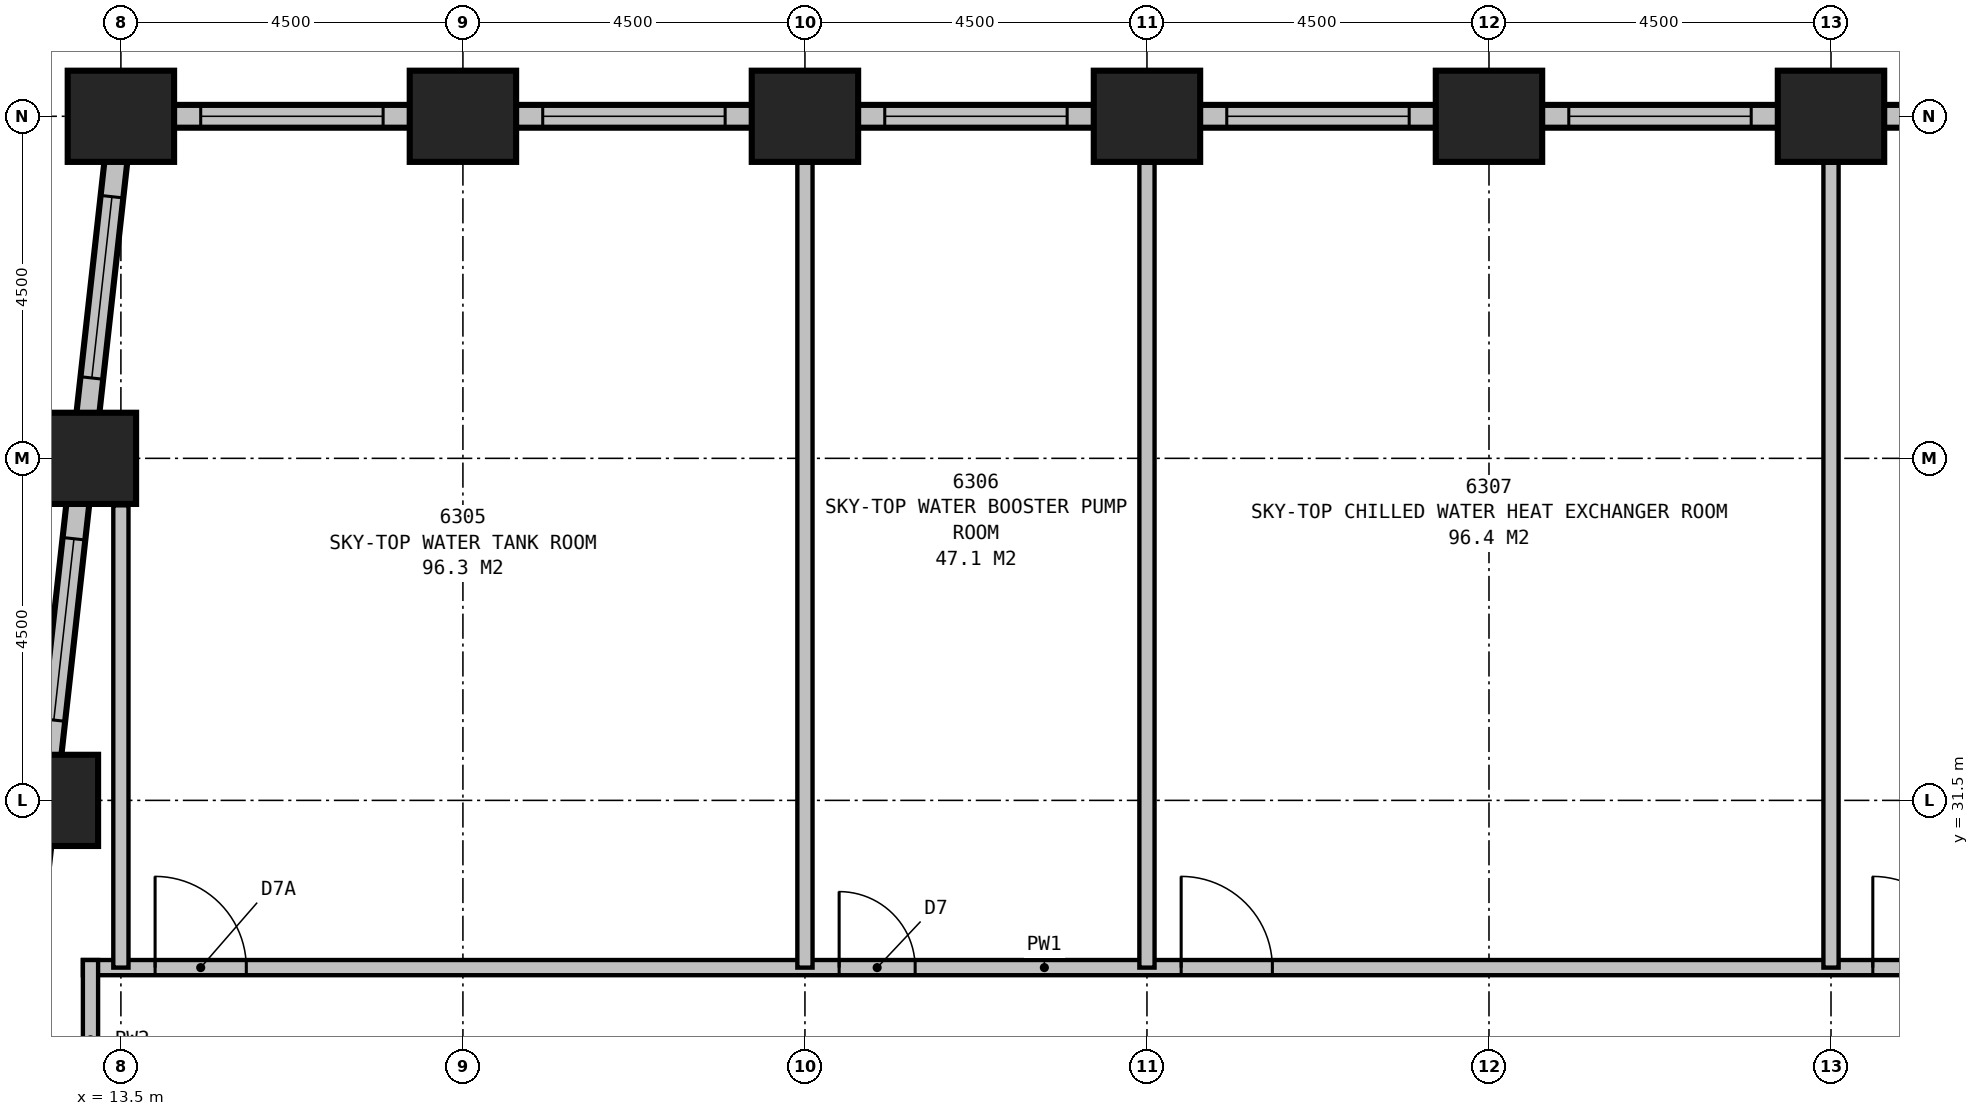
"""IFC4 building model, lengths in metres.
Left out: names, types, materials, properties, quantities, classifications, styles, units other than length and angle.
Written with IfcOpenShell. Run it as: python <this file> out.ifc"""

import sys

from ifc_helpers import new_model, si_unit, direction, frame, frame_2d, origin, origin_2d, place, context, subcontext, project, spatial, rectangle, extrude, element, fill, save


model = new_model("IFC4")
c1 = context("Model", 3, precision=1e-05, world=origin(), true_north=direction((0.0, 1.0)))
c2 = subcontext(c1, "Body", "Model", "MODEL_VIEW")
j1 = project(units=[si_unit("LENGTHUNIT", "METRE"), si_unit("PLANEANGLEUNIT", "RADIAN")], contexts=[c1])
p1 = place(None, origin())
s1 = spatial("IfcSite", under=j1, at=p1, CompositionType="ELEMENT")
p2 = place(p1, origin())
s2 = spatial("IfcBuilding", under=s1, at=p2, CompositionType="ELEMENT")
p3 = place(p2, frame((0.0, 0.0, 244.7)))
s3 = spatial("IfcBuildingStorey", under=s2, at=p3, CompositionType="ELEMENT", Elevation=244.7)
for number, where, z_axis, x_axis in (
    (1, (36.0, 40.5, 0.0), (0.0, 0.0, 1.0), (1.0, 0.0, 0.0)),
    (2, (31.5, 40.5, 0.0), (0.0, 0.0, 1.0), (1.0, 0.0, 0.0)),
    (3, (27.0, 40.5, 0.0), (0.0, 0.0, 1.0), (1.0, 0.0, 0.0)),
    (4, (22.5, 40.5, 0.0), (0.0, 0.0, 1.0), (1.0, 0.0, 0.0)),
    (5, (18.0, 40.5, 0.0), (0.0, 0.0, 1.0), (1.0, 0.0, 0.0)),
    (6, (13.5, 40.5, 0.0), (0.0, 0.0, 1.0), (1.0, 0.0, 0.0)),
    (7, (13.0, 36.0, 0.0), (0.0, 0.0, 1.0), (1.0, 0.0, 0.0)),
    (8, (12.5, 31.5, 0.0), (0.0, 0.0, 1.0), (1.0, 0.0, 0.0)),
):
    element("IfcColumn", number, at=place(p3, frame(where, z_axis=z_axis, x_axis=x_axis)), inside=s3, PredefinedType="COLUMN", context=c2, shape_type="SweptSolid", body=[
        extrude(rectangle(XDim=1.4, YDim=1.2, at=origin_2d()), origin(), (0.0, 0.0, 1.0), 6.0),
    ])
p4 = place(p3, frame((40.65, 40.5, 0.0), z_axis=(0.0, 0.0, 1.0), x_axis=(-1.0, 0.0, 0.0)))
e9 = element("IfcWall", 9, at=p4, inside=s3, PredefinedType="STANDARD", context=c2, shape_type="SweptSolid", body=[
    extrude(rectangle(XDim=27.3, YDim=0.3, at=frame_2d((13.65, 0.0))), origin(), (0.0, 0.0, 1.0), 4.45),
])
p5 = place(p4, frame((1.2, 0.0, 0.5)))
e10 = element("IfcOpeningElement", 10, at=p5, cuts=e9, PredefinedType="OPENING", context=c2, shape_type="SweptSolid", body=[
    extrude(rectangle(XDim=2.4, YDim=2.0, at=frame_2d((1.2, 1.0))), frame((0.0, 0.16, 0.0), z_axis=(0.0, -1.0, 0.0), x_axis=(1.0, 0.0, 0.0)), (0.0, 0.0, 1.0), 0.32),
])
p6 = place(p4, frame((5.7, 0.0, 0.5)))
e11 = element("IfcOpeningElement", 11, at=p6, cuts=e9, PredefinedType="OPENING", context=c2, shape_type="SweptSolid", body=[
    extrude(rectangle(XDim=2.4, YDim=2.0, at=frame_2d((1.2, 1.0))), frame((0.0, 0.16, 0.0), z_axis=(0.0, -1.0, 0.0), x_axis=(1.0, 0.0, 0.0)), (0.0, 0.0, 1.0), 0.32),
])
p7 = place(p4, frame((10.2, 0.0, 0.5)))
e12 = element("IfcOpeningElement", 12, at=p7, cuts=e9, PredefinedType="OPENING", context=c2, shape_type="SweptSolid", body=[
    extrude(rectangle(XDim=2.4, YDim=2.0, at=frame_2d((1.2, 1.0))), frame((0.0, 0.16, 0.0), z_axis=(0.0, -1.0, 0.0), x_axis=(1.0, 0.0, 0.0)), (0.0, 0.0, 1.0), 0.32),
])
p8 = place(p4, frame((14.7, 0.0, 0.5)))
e13 = element("IfcOpeningElement", 13, at=p8, cuts=e9, PredefinedType="OPENING", context=c2, shape_type="SweptSolid", body=[
    extrude(rectangle(XDim=2.4, YDim=2.0, at=frame_2d((1.2, 1.0))), frame((0.0, 0.16, 0.0), z_axis=(0.0, -1.0, 0.0), x_axis=(1.0, 0.0, 0.0)), (0.0, 0.0, 1.0), 0.32),
])
p9 = place(p4, frame((19.2, 0.0, 0.5)))
e14 = element("IfcOpeningElement", 14, at=p9, cuts=e9, PredefinedType="OPENING", context=c2, shape_type="SweptSolid", body=[
    extrude(rectangle(XDim=2.4, YDim=2.0, at=frame_2d((1.2, 1.0))), frame((0.0, 0.16, 0.0), z_axis=(0.0, -1.0, 0.0), x_axis=(1.0, 0.0, 0.0)), (0.0, 0.0, 1.0), 0.32),
])
p10 = place(p4, frame((23.7, 0.0, 0.5)))
e15 = element("IfcOpeningElement", 15, at=p10, cuts=e9, PredefinedType="OPENING", context=c2, shape_type="SweptSolid", body=[
    extrude(rectangle(XDim=2.4, YDim=2.0, at=frame_2d((1.2, 1.0))), frame((0.0, 0.16, 0.0), z_axis=(0.0, -1.0, 0.0), x_axis=(1.0, 0.0, 0.0)), (0.0, 0.0, 1.0), 0.32),
])
p11 = place(p3, frame((13.517, 40.649, 0.0), z_axis=(0.0, 0.0, 1.0), x_axis=(-0.110433201132, -0.993883548555, 0.0)))
e16 = element("IfcWall", 16, at=p11, inside=s3, PredefinedType="STANDARD", context=c2, shape_type="SweptSolid", body=[
    extrude(rectangle(XDim=31.994, YDim=0.3, at=frame_2d((15.997, 0.0))), origin(), (0.0, 0.0, 1.0), 4.45),
])
p12 = place(p11, frame((1.214, 0.0, 0.5)))
e17 = element("IfcOpeningElement", 17, at=p12, cuts=e16, PredefinedType="OPENING", context=c2, shape_type="SweptSolid", body=[
    extrude(rectangle(XDim=2.4, YDim=2.0, at=frame_2d((1.2, 1.0))), frame((0.0, 0.16, 0.0), z_axis=(0.0, -1.0, 0.0), x_axis=(1.0, 0.0, 0.0)), (0.0, 0.0, 1.0), 0.32),
])
p13 = place(p11, frame((5.742, 0.0, 0.5)))
e18 = element("IfcOpeningElement", 18, at=p13, cuts=e16, PredefinedType="OPENING", context=c2, shape_type="SweptSolid", body=[
    extrude(rectangle(XDim=2.4, YDim=2.0, at=frame_2d((1.2, 1.0))), frame((0.0, 0.16, 0.0), z_axis=(0.0, -1.0, 0.0), x_axis=(1.0, 0.0, 0.0)), (0.0, 0.0, 1.0), 0.32),
])
p14 = place(p11, frame((10.269, 0.0, 0.5)))
e19 = element("IfcOpeningElement", 19, at=p14, cuts=e16, PredefinedType="OPENING", context=c2, shape_type="SweptSolid", body=[
    extrude(rectangle(XDim=2.4, YDim=2.0, at=frame_2d((1.2, 1.0))), frame((0.0, 0.16, 0.0), z_axis=(0.0, -1.0, 0.0), x_axis=(1.0, 0.0, 0.0)), (0.0, 0.0, 1.0), 0.32),
])
p15 = place(p11, frame((14.797, 0.0, 0.5)))
e20 = element("IfcOpeningElement", 20, at=p15, cuts=e16, PredefinedType="OPENING", context=c2, shape_type="SweptSolid", body=[
    extrude(rectangle(XDim=2.4, YDim=2.0, at=frame_2d((1.2, 1.0))), frame((0.0, 0.16, 0.0), z_axis=(0.0, -1.0, 0.0), x_axis=(1.0, 0.0, 0.0)), (0.0, 0.0, 1.0), 0.32),
])
p16 = place(p11, frame((19.325, 0.0, 0.5)))
e21 = element("IfcOpeningElement", 21, at=p16, cuts=e16, PredefinedType="OPENING", context=c2, shape_type="SweptSolid", body=[
    extrude(rectangle(XDim=2.4, YDim=2.0, at=frame_2d((1.2, 1.0))), frame((0.0, 0.16, 0.0), z_axis=(0.0, -1.0, 0.0), x_axis=(1.0, 0.0, 0.0)), (0.0, 0.0, 1.0), 0.32),
])
p17 = place(p11, frame((23.852, 0.0, 0.5)))
e22 = element("IfcOpeningElement", 22, at=p17, cuts=e16, PredefinedType="OPENING", context=c2, shape_type="SweptSolid", body=[
    extrude(rectangle(XDim=2.4, YDim=2.0, at=frame_2d((1.2, 1.0))), frame((0.0, 0.16, 0.0), z_axis=(0.0, -1.0, 0.0), x_axis=(1.0, 0.0, 0.0)), (0.0, 0.0, 1.0), 0.32),
])
p18 = place(p11, frame((28.38, 0.0, 0.5)))
e23 = element("IfcOpeningElement", 23, at=p18, cuts=e16, PredefinedType="OPENING", context=c2, shape_type="SweptSolid", body=[
    extrude(rectangle(XDim=2.4, YDim=2.0, at=frame_2d((1.2, 1.0))), frame((0.0, 0.16, 0.0), z_axis=(0.0, -1.0, 0.0), x_axis=(1.0, 0.0, 0.0)), (0.0, 0.0, 1.0), 0.32),
])
p19 = place(p3, frame((13.0, 29.3, 0.0), z_axis=(0.0, 0.0, 1.0), x_axis=(1.0, 0.0, 0.0)))
e24 = element("IfcWall", 24, at=p19, inside=s3, PredefinedType="PARTITIONING", context=c2, shape_type="SweptSolid", body=[
    extrude(rectangle(XDim=25.3, YDim=0.2, at=frame_2d((12.65, 0.0))), origin(), (0.0, 0.0, 1.0), 5.75),
])
p20 = place(p19, frame((0.95, 0.0, 0.0)))
e25 = element("IfcOpeningElement", 25, at=p20, cuts=e24, PredefinedType="OPENING", context=c2, shape_type="SweptSolid", body=[
    extrude(rectangle(XDim=1.2, YDim=2.1, at=frame_2d((0.6, 1.05))), frame((0.0, 0.11, 0.0), z_axis=(0.0, -1.0, 0.0), x_axis=(1.0, 0.0, 0.0)), (0.0, 0.0, 1.0), 0.22),
])
p21 = place(p19, frame((9.95, 0.0, 0.0)))
e26 = element("IfcOpeningElement", 26, at=p21, cuts=e24, PredefinedType="OPENING", context=c2, shape_type="SweptSolid", body=[
    extrude(rectangle(XDim=1.0, YDim=2.1, at=frame_2d((0.5, 1.05))), frame((0.0, 0.11, 0.0), z_axis=(0.0, -1.0, 0.0), x_axis=(1.0, 0.0, 0.0)), (0.0, 0.0, 1.0), 0.22),
])
p22 = place(p19, frame((14.45, 0.0, 0.0)))
e27 = element("IfcOpeningElement", 27, at=p22, cuts=e24, PredefinedType="OPENING", context=c2, shape_type="SweptSolid", body=[
    extrude(rectangle(XDim=1.2, YDim=2.1, at=frame_2d((0.6, 1.05))), frame((0.0, 0.11, 0.0), z_axis=(0.0, -1.0, 0.0), x_axis=(1.0, 0.0, 0.0)), (0.0, 0.0, 1.0), 0.22),
])
p23 = place(p19, frame((23.55, 0.0, 0.0)))
e28 = element("IfcOpeningElement", 28, at=p23, cuts=e24, PredefinedType="OPENING", context=c2, shape_type="SweptSolid", body=[
    extrude(rectangle(XDim=1.2, YDim=2.1, at=frame_2d((0.6, 1.05))), frame((0.0, 0.11, 0.0), z_axis=(0.0, -1.0, 0.0), x_axis=(1.0, 0.0, 0.0)), (0.0, 0.0, 1.0), 0.22),
])
p24 = place(p3, frame((13.5, 29.3, 0.0), z_axis=(0.0, 0.0, 1.0), x_axis=(0.0, 1.0, 0.0)))
e29 = element("IfcWall", 29, at=p24, inside=s3, PredefinedType="PARTITIONING", context=c2, shape_type="SweptSolid", body=[
    extrude(rectangle(XDim=6.082, YDim=0.2, at=frame_2d((3.041, 0.0))), origin(), (0.0, 0.0, 1.0), 4.45),
])
for number, where, z_axis, x_axis in (
    (30, (22.5, 29.3, 0.0), (0.0, 0.0, 1.0), (0.0, 1.0, 0.0)),
    (31, (27.0, 29.3, 0.0), (0.0, 0.0, 1.0), (0.0, 1.0, 0.0)),
    (32, (36.0, 29.3, 0.0), (0.0, 0.0, 1.0), (0.0, 1.0, 0.0)),
):
    element("IfcWall", number, at=place(p3, frame(where, z_axis=z_axis, x_axis=x_axis)), inside=s3, PredefinedType="PARTITIONING", context=c2, shape_type="SweptSolid", body=[
        extrude(rectangle(XDim=10.59, YDim=0.2, at=frame_2d((5.295, 0.0))), origin(), (0.0, 0.0, 1.0), 4.75),
    ])
p25 = place(p3, frame((13.1, 27.3, 0.0), z_axis=(0.0, 0.0, 1.0), x_axis=(0.0, 1.0, 0.0)))
e33 = element("IfcWall", 33, at=p25, inside=s3, PredefinedType="PARTITIONING", context=c2, shape_type="SweptSolid", body=[
    extrude(rectangle(XDim=2.1, YDim=0.2, at=frame_2d((1.05, 0.0))), origin(), (0.0, 0.0, 1.0), 5.75),
])
p26 = place(p6, origin())
e34 = element("IfcWindow", 34, at=p26, inside=s3, PartitioningType="SINGLE_PANEL", PredefinedType="USERDEFINED", context=c2, shape_type="SweptSolid", body=[
    extrude(rectangle(XDim=2.4, YDim=2.0, at=frame_2d((1.2, 1.0))), frame((0.0, 0.03, 0.0), z_axis=(0.0, -1.0, 0.0), x_axis=(1.0, 0.0, 0.0)), (0.0, 0.0, 1.0), 0.06),
])
fill(e11, e34)
p27 = place(p7, origin())
e35 = element("IfcWindow", 35, at=p27, inside=s3, PartitioningType="SINGLE_PANEL", PredefinedType="USERDEFINED", context=c2, shape_type="SweptSolid", body=[
    extrude(rectangle(XDim=2.4, YDim=2.0, at=frame_2d((1.2, 1.0))), frame((0.0, 0.03, 0.0), z_axis=(0.0, -1.0, 0.0), x_axis=(1.0, 0.0, 0.0)), (0.0, 0.0, 1.0), 0.06),
])
fill(e12, e35)
p28 = place(p8, origin())
e36 = element("IfcWindow", 36, at=p28, inside=s3, PartitioningType="SINGLE_PANEL", PredefinedType="USERDEFINED", context=c2, shape_type="SweptSolid", body=[
    extrude(rectangle(XDim=2.4, YDim=2.0, at=frame_2d((1.2, 1.0))), frame((0.0, 0.03, 0.0), z_axis=(0.0, -1.0, 0.0), x_axis=(1.0, 0.0, 0.0)), (0.0, 0.0, 1.0), 0.06),
])
fill(e13, e36)
p29 = place(p9, origin())
e37 = element("IfcWindow", 37, at=p29, inside=s3, PartitioningType="SINGLE_PANEL", PredefinedType="USERDEFINED", context=c2, shape_type="SweptSolid", body=[
    extrude(rectangle(XDim=2.4, YDim=2.0, at=frame_2d((1.2, 1.0))), frame((0.0, 0.03, 0.0), z_axis=(0.0, -1.0, 0.0), x_axis=(1.0, 0.0, 0.0)), (0.0, 0.0, 1.0), 0.06),
])
fill(e14, e37)
p30 = place(p10, origin())
e38 = element("IfcWindow", 38, at=p30, inside=s3, PartitioningType="SINGLE_PANEL", PredefinedType="USERDEFINED", context=c2, shape_type="SweptSolid", body=[
    extrude(rectangle(XDim=2.4, YDim=2.0, at=frame_2d((1.2, 1.0))), frame((0.0, 0.03, 0.0), z_axis=(0.0, -1.0, 0.0), x_axis=(1.0, 0.0, 0.0)), (0.0, 0.0, 1.0), 0.06),
])
fill(e15, e38)
p31 = place(p12, origin())
e39 = element("IfcWindow", 39, at=p31, inside=s3, PartitioningType="SINGLE_PANEL", PredefinedType="USERDEFINED", context=c2, shape_type="SweptSolid", body=[
    extrude(rectangle(XDim=2.4, YDim=2.0, at=frame_2d((1.2, 1.0))), frame((0.0, 0.03, 0.0), z_axis=(0.0, -1.0, 0.0), x_axis=(1.0, 0.0, 0.0)), (0.0, 0.0, 1.0), 0.06),
])
fill(e17, e39)
p32 = place(p13, origin())
e40 = element("IfcWindow", 40, at=p32, inside=s3, PartitioningType="SINGLE_PANEL", PredefinedType="USERDEFINED", context=c2, shape_type="SweptSolid", body=[
    extrude(rectangle(XDim=2.4, YDim=2.0, at=frame_2d((1.2, 1.0))), frame((0.0, 0.03, 0.0), z_axis=(0.0, -1.0, 0.0), x_axis=(1.0, 0.0, 0.0)), (0.0, 0.0, 1.0), 0.06),
])
fill(e18, e40)
p33 = place(p20, origin())
e41 = element("IfcDoor", 41, at=p33, inside=s3, OperationType="SINGLE_SWING_LEFT", PredefinedType="DOOR", context=c2, shape_type="SweptSolid", body=[
    extrude(rectangle(XDim=1.2, YDim=2.1, at=frame_2d((0.6, 1.05))), frame((0.0, 0.025, 0.0), z_axis=(0.0, -1.0, 0.0), x_axis=(1.0, 0.0, 0.0)), (0.0, 0.0, 1.0), 0.05),
])
fill(e25, e41)
p34 = place(p21, origin())
e42 = element("IfcDoor", 42, at=p34, inside=s3, OperationType="SINGLE_SWING_LEFT", PredefinedType="DOOR", context=c2, shape_type="SweptSolid", body=[
    extrude(rectangle(XDim=1.0, YDim=2.1, at=frame_2d((0.5, 1.05))), frame((0.0, 0.025, 0.0), z_axis=(0.0, -1.0, 0.0), x_axis=(1.0, 0.0, 0.0)), (0.0, 0.0, 1.0), 0.05),
])
fill(e26, e42)
p35 = place(p22, origin())
e43 = element("IfcDoor", 43, at=p35, inside=s3, OperationType="SINGLE_SWING_LEFT", PredefinedType="DOOR", context=c2, shape_type="SweptSolid", body=[
    extrude(rectangle(XDim=1.2, YDim=2.1, at=frame_2d((0.6, 1.05))), frame((0.0, 0.025, 0.0), z_axis=(0.0, -1.0, 0.0), x_axis=(1.0, 0.0, 0.0)), (0.0, 0.0, 1.0), 0.05),
])
fill(e27, e43)
p36 = place(p23, origin())
e44 = element("IfcDoor", 44, at=p36, inside=s3, OperationType="SINGLE_SWING_LEFT", PredefinedType="DOOR", context=c2, shape_type="SweptSolid", body=[
    extrude(rectangle(XDim=1.2, YDim=2.1, at=frame_2d((0.6, 1.05))), frame((0.0, 0.025, 0.0), z_axis=(0.0, -1.0, 0.0), x_axis=(1.0, 0.0, 0.0)), (0.0, 0.0, 1.0), 0.05),
])
fill(e28, e44)
save(model, sys.argv[1])
